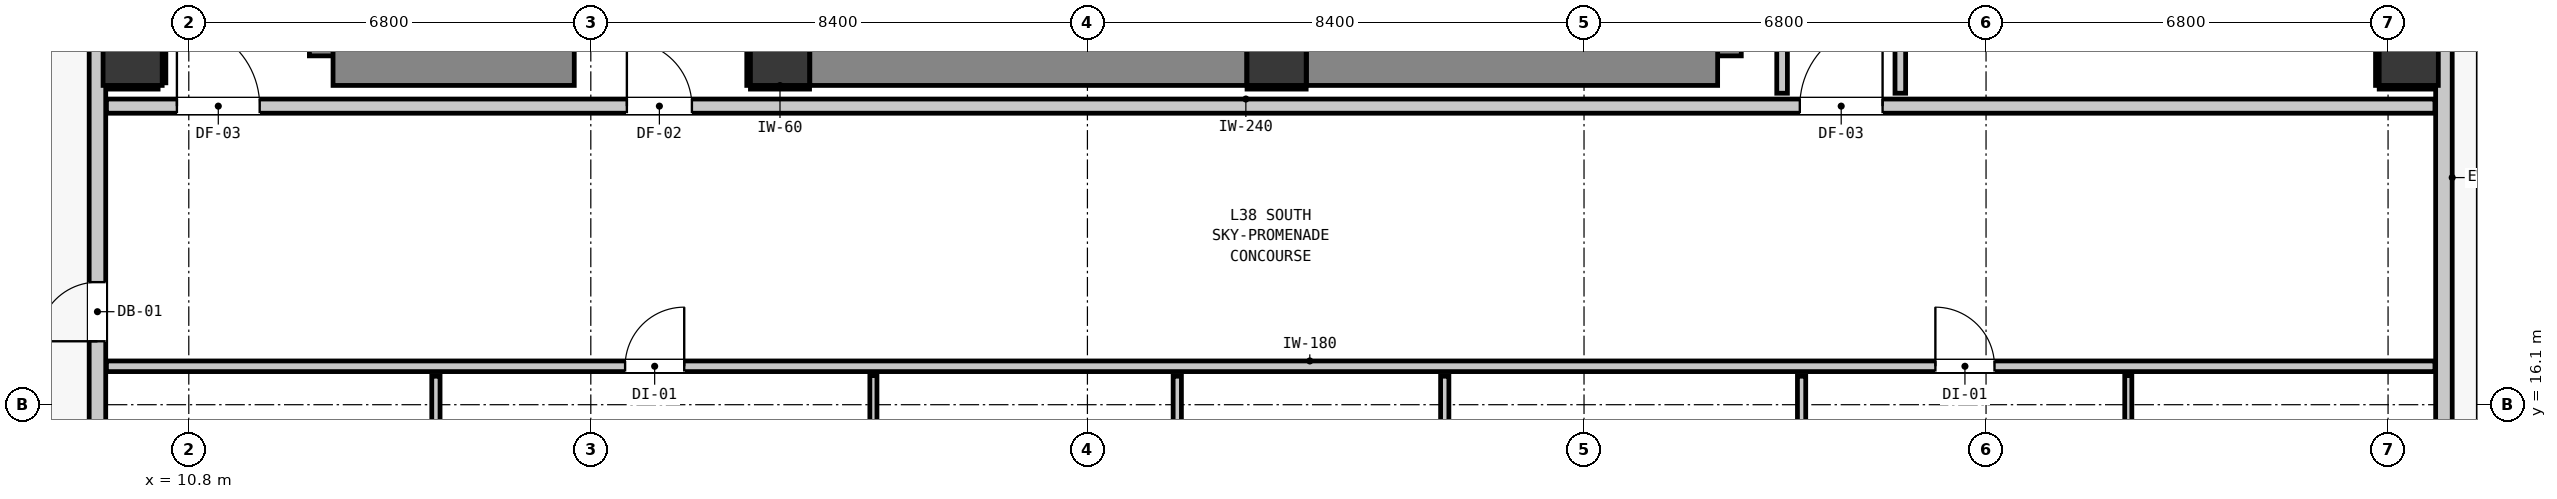
"""IFC4 building model, lengths in metres.
Left out: names, types, materials, properties, quantities, classifications, styles, units other than length and angle.
Written with IfcOpenShell. Run it as: python <this file> out.ifc"""

import sys

from ifc_helpers import new_model, si_unit, direction, frame, frame_2d, origin, origin_2d, place, context, subcontext, project, spatial, rectangle, extrude, element, fill, save


model = new_model("IFC4")
c1 = context("Model", 3, precision=1e-05, world=origin(), true_north=direction((0.0, 1.0)))
c2 = subcontext(c1, "Body", "Model", "MODEL_VIEW")
j1 = project(units=[si_unit("LENGTHUNIT", "METRE"), si_unit("PLANEANGLEUNIT", "RADIAN")], contexts=[c1])
p1 = place(None, origin())
s1 = spatial("IfcSite", under=j1, at=p1, CompositionType="ELEMENT")
p2 = place(p1, origin())
s2 = spatial("IfcBuilding", under=s1, at=p2, CompositionType="ELEMENT")
p3 = place(p2, frame((0.0, 0.0, 132.64)))
s3 = spatial("IfcBuildingStorey", under=s2, at=p3, CompositionType="ELEMENT", Elevation=132.64)
for number, where, z_axis, x_axis in (
    (1, (20.8, 22.0, 0.0), (0.0, 0.0, 1.0), (1.0, 0.0, 0.0)),
    (2, (29.2, 22.0, 0.0), (0.0, 0.0, 1.0), (1.0, 0.0, 0.0)),
):
    element("IfcColumn", number, at=place(p3, frame(where, z_axis=z_axis, x_axis=x_axis)), inside=s3, PredefinedType="COLUMN", context=c2, shape_type="SweptSolid", body=[
        extrude(rectangle(XDim=1.0, YDim=1.0, at=origin_2d()), origin(), (0.0, 0.0, 1.0), 3.32),
    ])
p4 = place(p3, frame((13.34, 22.0, 0.0), z_axis=(0.0, 0.0, 1.0), x_axis=(0.0, 1.0, 0.0)))
e3 = element("IfcWall", 3, at=p4, inside=s3, PredefinedType="SHEAR", context=c2, shape_type="SweptSolid", body=[
    extrude(rectangle(XDim=8.195, YDim=1.0, at=frame_2d((4.098, 0.0))), origin(), (0.0, 0.0, 1.0), 3.32),
])
p5 = place(p3, frame((13.24, 22.0, 0.0), z_axis=(0.0, 0.0, 1.0), x_axis=(1.0, 0.0, 0.0)))
e4 = element("IfcWall", 4, at=p5, inside=s3, PredefinedType="SHEAR", context=c2, shape_type="SweptSolid", body=[
    extrude(rectangle(XDim=4.08, YDim=1.0, at=frame_2d((2.04, 0.0))), origin(), (0.0, 0.0, 1.0), 3.32),
])
p6 = place(p3, frame((36.56, 22.0, 0.0), z_axis=(0.0, 0.0, 1.0), x_axis=(0.0, 1.0, 0.0)))
e5 = element("IfcWall", 5, at=p6, inside=s3, PredefinedType="SHEAR", context=c2, shape_type="SweptSolid", body=[
    extrude(rectangle(XDim=8.195, YDim=1.0, at=frame_2d((4.098, 0.0))), origin(), (0.0, 0.0, 1.0), 3.32),
])
p7 = place(p3, frame((29.705, 22.0, 0.0), z_axis=(0.0, 0.0, 1.0), x_axis=(1.0, 0.0, 0.0)))
e6 = element("IfcWall", 6, at=p7, inside=s3, PredefinedType="SHEAR", context=c2, shape_type="SweptSolid", body=[
    extrude(rectangle(XDim=6.955, YDim=1.0, at=frame_2d((3.478, 0.0))), origin(), (0.0, 0.0, 1.0), 3.32),
])
p8 = place(p3, frame((21.305, 22.0, 0.0), z_axis=(0.0, 0.0, 1.0), x_axis=(1.0, 0.0, 0.0)))
e7 = element("IfcWall", 7, at=p8, inside=s3, PredefinedType="SHEAR", context=c2, shape_type="SweptSolid", body=[
    extrude(rectangle(XDim=7.39, YDim=1.0, at=frame_2d((3.695, 0.0))), origin(), (0.0, 0.0, 1.0), 3.32),
])
for number, where, z_axis, x_axis in (
    (8, (9.85, 22.0, 0.0), (0.0, 0.0, 1.0), (1.0, 0.0, 0.0)),
    (9, (48.35, 22.0, 0.0), (0.0, 0.0, 1.0), (1.0, 0.0, 0.0)),
):
    element("IfcColumn", number, at=place(p3, frame(where, z_axis=z_axis, x_axis=x_axis)), inside=s3, PredefinedType="COLUMN", context=c2, shape_type="SweptSolid", body=[
        extrude(rectangle(XDim=1.0, YDim=1.0, at=origin_2d()), origin(), (0.0, 0.0, 1.0), 3.32),
    ])
p9 = place(p3, frame((9.255, 11.355, 0.0), z_axis=(0.0, 0.0, 1.0), x_axis=(0.0, 1.0, 0.0)))
e10 = element("IfcWall", 10, at=p9, inside=s3, PredefinedType="STANDARD", context=c2, shape_type="SweptSolid", body=[
    extrude(rectangle(XDim=32.29, YDim=0.28, at=frame_2d((16.145, 0.0))), origin(), (0.0, 0.0, 1.0), 3.08),
])
p10 = place(p9, frame((5.818, 0.0, 0.0)))
e11 = element("IfcOpeningElement", 11, at=p10, cuts=e10, PredefinedType="OPENING", context=c2, shape_type="SweptSolid", body=[
    extrude(rectangle(XDim=1.0, YDim=2.15, at=frame_2d((0.5, 1.075))), frame((0.0, 0.15, 0.0), z_axis=(0.0, -1.0, 0.0), x_axis=(1.0, 0.0, 0.0)), (0.0, 0.0, 1.0), 0.3),
])
p11 = place(p9, frame((0.544, 0.0, 0.85)))
e12 = element("IfcOpeningElement", 12, at=p11, cuts=e10, PredefinedType="OPENING", context=c2, shape_type="SweptSolid", body=[
    extrude(rectangle(XDim=1.05, YDim=1.65, at=frame_2d((0.525, 0.825))), frame((0.0, 0.15, 0.0), z_axis=(0.0, -1.0, 0.0), x_axis=(1.0, 0.0, 0.0)), (0.0, 0.0, 1.0), 0.3),
])
p12 = place(p3, frame((48.945, 43.645, 0.0), z_axis=(0.0, 0.0, 1.0), x_axis=(0.0, -1.0, 0.0)))
e13 = element("IfcWall", 13, at=p12, inside=s3, PredefinedType="STANDARD", context=c2, shape_type="SweptSolid", body=[
    extrude(rectangle(XDim=32.29, YDim=0.28, at=frame_2d((16.145, 0.0))), origin(), (0.0, 0.0, 1.0), 3.08),
])
p13 = place(p12, frame((5.467, 0.0, 0.0)))
e14 = element("IfcOpeningElement", 14, at=p13, cuts=e13, PredefinedType="OPENING", context=c2, shape_type="SweptSolid", body=[
    extrude(rectangle(XDim=1.0, YDim=2.15, at=frame_2d((0.5, 1.075))), frame((0.0, 0.15, 0.0), z_axis=(0.0, -1.0, 0.0), x_axis=(1.0, 0.0, 0.0)), (0.0, 0.0, 1.0), 0.3),
])
p14 = place(p12, frame((30.696, 0.0, 0.85)))
e15 = element("IfcOpeningElement", 15, at=p14, cuts=e13, PredefinedType="OPENING", context=c2, shape_type="SweptSolid", body=[
    extrude(rectangle(XDim=1.05, YDim=1.65, at=frame_2d((0.525, 0.825))), frame((0.0, 0.15, 0.0), z_axis=(0.0, -1.0, 0.0), x_axis=(1.0, 0.0, 0.0)), (0.0, 0.0, 1.0), 0.3),
])
p15 = place(p12, frame((14.611, 0.0, 0.85)))
e16 = element("IfcOpeningElement", 16, at=p15, cuts=e13, PredefinedType="OPENING", context=c2, shape_type="SweptSolid", body=[
    extrude(rectangle(XDim=2.1, YDim=1.9, at=frame_2d((1.05, 0.95))), frame((0.0, 0.15, 0.0), z_axis=(0.0, -1.0, 0.0), x_axis=(1.0, 0.0, 0.0)), (0.0, 0.0, 1.0), 0.3),
])
p16 = place(p12, frame((7.106, 0.0, 0.85)))
e17 = element("IfcOpeningElement", 17, at=p16, cuts=e13, PredefinedType="OPENING", context=c2, shape_type="SweptSolid", body=[
    extrude(rectangle(XDim=1.05, YDim=1.65, at=frame_2d((0.525, 0.825))), frame((0.0, 0.15, 0.0), z_axis=(0.0, -1.0, 0.0), x_axis=(1.0, 0.0, 0.0)), (0.0, 0.0, 1.0), 0.3),
])
p17 = place(p3, frame((9.407, 21.15, 0.0), z_axis=(0.0, 0.0, 1.0), x_axis=(1.0, 0.0, 0.0)))
e18 = element("IfcWall", 18, at=p17, inside=s3, PredefinedType="PARTITIONING", context=c2, shape_type="SweptSolid", body=[
    extrude(rectangle(XDim=39.386, YDim=0.24, at=frame_2d((19.693, 0.0))), origin(), (0.0, 0.0, 1.0), 3.08),
])
p18 = place(p17, frame((8.803, 0.0, 0.0)))
e19 = element("IfcOpeningElement", 19, at=p18, cuts=e18, PredefinedType="OPENING", context=c2, shape_type="SweptSolid", body=[
    extrude(rectangle(XDim=1.1, YDim=2.15, at=frame_2d((0.55, 1.075))), frame((0.0, 0.13, 0.0), z_axis=(0.0, -1.0, 0.0), x_axis=(1.0, 0.0, 0.0)), (0.0, 0.0, 1.0), 0.26),
])
p19 = place(p17, frame((1.192, 0.0, 0.0)))
e20 = element("IfcOpeningElement", 20, at=p19, cuts=e18, PredefinedType="OPENING", context=c2, shape_type="SweptSolid", body=[
    extrude(rectangle(XDim=1.4, YDim=2.15, at=frame_2d((0.7, 1.075))), frame((0.0, 0.13, 0.0), z_axis=(0.0, -1.0, 0.0), x_axis=(1.0, 0.0, 0.0)), (0.0, 0.0, 1.0), 0.26),
])
p20 = place(p17, frame((28.643, 0.0, 0.0)))
e21 = element("IfcOpeningElement", 21, at=p20, cuts=e18, PredefinedType="OPENING", context=c2, shape_type="SweptSolid", body=[
    extrude(rectangle(XDim=1.4, YDim=2.15, at=frame_2d((0.7, 1.075))), frame((0.0, 0.13, 0.0), z_axis=(0.0, -1.0, 0.0), x_axis=(1.0, 0.0, 0.0)), (0.0, 0.0, 1.0), 0.26),
])
p21 = place(p3, frame((9.407, 16.75, 0.0), z_axis=(0.0, 0.0, 1.0), x_axis=(1.0, 0.0, 0.0)))
e22 = element("IfcWall", 22, at=p21, inside=s3, PredefinedType="PARTITIONING", context=c2, shape_type="SweptSolid", body=[
    extrude(rectangle(XDim=39.386, YDim=0.18, at=frame_2d((19.693, 0.0))), origin(), (0.0, 0.0, 1.0), 3.08),
])
p22 = place(p21, frame((8.773, 0.0, 0.0)))
e23 = element("IfcOpeningElement", 23, at=p22, cuts=e22, PredefinedType="OPENING", context=c2, shape_type="SweptSolid", body=[
    extrude(rectangle(XDim=1.0, YDim=2.15, at=frame_2d((0.5, 1.075))), frame((0.0, 0.1, 0.0), z_axis=(0.0, -1.0, 0.0), x_axis=(1.0, 0.0, 0.0)), (0.0, 0.0, 1.0), 0.2),
])
p23 = place(p21, frame((30.936, 0.0, 0.0)))
e24 = element("IfcOpeningElement", 24, at=p23, cuts=e22, PredefinedType="OPENING", context=c2, shape_type="SweptSolid", body=[
    extrude(rectangle(XDim=1.0, YDim=2.15, at=frame_2d((0.5, 1.075))), frame((0.0, 0.1, 0.0), z_axis=(0.0, -1.0, 0.0), x_axis=(1.0, 0.0, 0.0)), (0.0, 0.0, 1.0), 0.2),
])
p24 = place(p3, frame((37.75, 21.368, 0.0), z_axis=(0.0, 0.0, 1.0), x_axis=(0.0, 1.0, 0.0)))
e25 = element("IfcWall", 25, at=p24, inside=s3, PredefinedType="PARTITIONING", context=c2, shape_type="SweptSolid", body=[
    extrude(rectangle(XDim=18.694, YDim=0.18, at=frame_2d((9.347, 0.0))), origin(), (0.0, 0.0, 1.0), 3.08),
])
p25 = place(p3, frame((39.75, 21.368, 0.0), z_axis=(0.0, 0.0, 1.0), x_axis=(0.0, 1.0, 0.0)))
e26 = element("IfcWall", 26, at=p25, inside=s3, PredefinedType="PARTITIONING", context=c2, shape_type="SweptSolid", body=[
    extrude(rectangle(XDim=3.964, YDim=0.18, at=frame_2d((1.982, 0.0))), origin(), (0.0, 0.0, 1.0), 3.08),
])
p26 = place(p3, frame((14.98, 13.652, 0.0), z_axis=(0.0, 0.0, 1.0), x_axis=(0.0, 1.0, 0.0)))
e27 = element("IfcWall", 27, at=p26, inside=s3, PredefinedType="PARTITIONING", context=c2, shape_type="SweptSolid", body=[
    extrude(rectangle(XDim=2.93, YDim=0.14, at=frame_2d((1.465, 0.0))), origin(), (0.0, 0.0, 1.0), 3.08),
])
p27 = place(p26, frame((1.032, 0.0, 0.0)))
e28 = element("IfcOpeningElement", 28, at=p27, cuts=e27, PredefinedType="OPENING", context=c2, shape_type="SweptSolid", body=[
    extrude(rectangle(XDim=0.86, YDim=2.02, at=frame_2d((0.43, 1.01))), frame((0.0, 0.08, 0.0), z_axis=(0.0, -1.0, 0.0), x_axis=(1.0, 0.0, 0.0)), (0.0, 0.0, 1.0), 0.16),
])
p28 = place(p3, frame((27.52, 13.652, 0.0), z_axis=(0.0, 0.0, 1.0), x_axis=(0.0, 1.0, 0.0)))
e29 = element("IfcWall", 29, at=p28, inside=s3, PredefinedType="PARTITIONING", context=c2, shape_type="SweptSolid", body=[
    extrude(rectangle(XDim=2.93, YDim=0.14, at=frame_2d((1.465, 0.0))), origin(), (0.0, 0.0, 1.0), 3.08),
])
p29 = place(p28, frame((1.025, 0.0, 0.0)))
e30 = element("IfcOpeningElement", 30, at=p29, cuts=e29, PredefinedType="OPENING", context=c2, shape_type="SweptSolid", body=[
    extrude(rectangle(XDim=0.9, YDim=2.1, at=frame_2d((0.45, 1.05))), frame((0.0, 0.08, 0.0), z_axis=(0.0, -1.0, 0.0), x_axis=(1.0, 0.0, 0.0)), (0.0, 0.0, 1.0), 0.16),
])
p30 = place(p3, frame((32.044, 13.652, 0.0), z_axis=(0.0, 0.0, 1.0), x_axis=(0.0, 1.0, 0.0)))
e31 = element("IfcWall", 31, at=p30, inside=s3, PredefinedType="PARTITIONING", context=c2, shape_type="SweptSolid", body=[
    extrude(rectangle(XDim=2.93, YDim=0.14, at=frame_2d((1.465, 0.0))), origin(), (0.0, 0.0, 1.0), 3.08),
])
p31 = place(p3, frame((38.08, 13.652, 0.0), z_axis=(0.0, 0.0, 1.0), x_axis=(0.0, 1.0, 0.0)))
e32 = element("IfcWall", 32, at=p31, inside=s3, PredefinedType="PARTITIONING", context=c2, shape_type="SweptSolid", body=[
    extrude(rectangle(XDim=2.93, YDim=0.14, at=frame_2d((1.465, 0.0))), origin(), (0.0, 0.0, 1.0), 3.08),
])
p32 = place(p31, frame((1.032, 0.0, 0.0)))
e33 = element("IfcOpeningElement", 33, at=p32, cuts=e32, PredefinedType="OPENING", context=c2, shape_type="SweptSolid", body=[
    extrude(rectangle(XDim=0.86, YDim=2.02, at=frame_2d((0.43, 1.01))), frame((0.0, 0.08, 0.0), z_axis=(0.0, -1.0, 0.0), x_axis=(1.0, 0.0, 0.0)), (0.0, 0.0, 1.0), 0.16),
])
p33 = place(p3, frame((22.38, 13.642, 0.0), z_axis=(0.0, 0.0, 1.0), x_axis=(0.0, 1.0, 0.0)))
e34 = element("IfcWall", 34, at=p33, inside=s3, PredefinedType="PARTITIONING", context=c2, shape_type="SweptSolid", body=[
    extrude(rectangle(XDim=2.95, YDim=0.12, at=frame_2d((1.475, 0.0))), origin(), (0.0, 0.0, 1.0), 3.08),
])
p34 = place(p33, frame((1.022, 0.0, 0.0)))
e35 = element("IfcOpeningElement", 35, at=p34, cuts=e34, PredefinedType="OPENING", context=c2, shape_type="SweptSolid", body=[
    extrude(rectangle(XDim=0.9, YDim=2.1, at=frame_2d((0.45, 1.05))), frame((0.0, 0.07, 0.0), z_axis=(0.0, -1.0, 0.0), x_axis=(1.0, 0.0, 0.0)), (0.0, 0.0, 1.0), 0.14),
])
p35 = place(p3, frame((43.606, 13.642, 0.0), z_axis=(0.0, 0.0, 1.0), x_axis=(0.0, 1.0, 0.0)))
e36 = element("IfcWall", 36, at=p35, inside=s3, PredefinedType="PARTITIONING", context=c2, shape_type="SweptSolid", body=[
    extrude(rectangle(XDim=2.95, YDim=0.12, at=frame_2d((1.475, 0.0))), origin(), (0.0, 0.0, 1.0), 3.08),
])
p36 = place(p35, frame((1.022, 0.0, 0.0)))
e37 = element("IfcOpeningElement", 37, at=p36, cuts=e36, PredefinedType="OPENING", context=c2, shape_type="SweptSolid", body=[
    extrude(rectangle(XDim=0.9, YDim=2.1, at=frame_2d((0.45, 1.05))), frame((0.0, 0.07, 0.0), z_axis=(0.0, -1.0, 0.0), x_axis=(1.0, 0.0, 0.0)), (0.0, 0.0, 1.0), 0.14),
])
for number, where, z_axis, x_axis in (
    (38, (20.3, 21.468, 0.0), (0.0, 0.0, 1.0), (1.0, 0.0, 0.0)),
    (39, (20.268, 21.5, 0.0), (0.0, 0.0, 1.0), (0.0, 1.0, 0.0)),
    (40, (28.7, 21.468, 0.0), (0.0, 0.0, 1.0), (1.0, 0.0, 0.0)),
):
    element("IfcWall", number, at=place(p3, frame(where, z_axis=z_axis, x_axis=x_axis)), inside=s3, PredefinedType="PARTITIONING", context=c2, shape_type="SweptSolid", body=[
        extrude(rectangle(XDim=1.0, YDim=0.06, at=frame_2d((0.5, 0.0))), origin(), (0.0, 0.0, 1.0), 1.45),
    ])
p37 = place(p3, frame((9.41, 21.468, 0.0), z_axis=(0.0, 0.0, 1.0), x_axis=(1.0, 0.0, 0.0)))
e41 = element("IfcWall", 41, at=p37, inside=s3, PredefinedType="PARTITIONING", context=c2, shape_type="SweptSolid", body=[
    extrude(rectangle(XDim=0.871, YDim=0.06, at=frame_2d((0.436, 0.0))), origin(), (0.0, 0.0, 1.0), 1.45),
])
p38 = place(p3, frame((10.382, 21.544, 0.0), z_axis=(0.0, 0.0, 1.0), x_axis=(0.0, 1.0, 0.0)))
e42 = element("IfcWall", 42, at=p38, inside=s3, PredefinedType="PARTITIONING", context=c2, shape_type="SweptSolid", body=[
    extrude(rectangle(XDim=0.956, YDim=0.06, at=frame_2d((0.478, 0.0))), origin(), (0.0, 0.0, 1.0), 1.45),
])
p39 = place(p3, frame((47.85, 21.468, 0.0), z_axis=(0.0, 0.0, 1.0), x_axis=(1.0, 0.0, 0.0)))
e43 = element("IfcWall", 43, at=p39, inside=s3, PredefinedType="PARTITIONING", context=c2, shape_type="SweptSolid", body=[
    extrude(rectangle(XDim=0.94, YDim=0.06, at=frame_2d((0.47, 0.0))), origin(), (0.0, 0.0, 1.0), 1.45),
])
p40 = place(p3, frame((47.818, 21.5, 0.0), z_axis=(0.0, 0.0, 1.0), x_axis=(0.0, 1.0, 0.0)))
e44 = element("IfcWall", 44, at=p40, inside=s3, PredefinedType="PARTITIONING", context=c2, shape_type="SweptSolid", body=[
    extrude(rectangle(XDim=1.0, YDim=0.06, at=frame_2d((0.5, 0.0))), origin(), (0.0, 0.0, 1.0), 1.45),
])
p41 = place(p10, origin())
e45 = element("IfcDoor", 45, at=p41, inside=s3, OperationType="SINGLE_SWING_LEFT", PredefinedType="DOOR", context=c2, shape_type="SweptSolid", body=[
    extrude(rectangle(XDim=1.0, YDim=2.15, at=frame_2d((0.5, 1.075))), frame((0.0, 0.025, 0.0), z_axis=(0.0, -1.0, 0.0), x_axis=(1.0, 0.0, 0.0)), (0.0, 0.0, 1.0), 0.05),
])
fill(e11, e45)
p42 = place(p18, origin())
e46 = element("IfcDoor", 46, at=p42, inside=s3, OperationType="SINGLE_SWING_LEFT", PredefinedType="DOOR", context=c2, shape_type="SweptSolid", body=[
    extrude(rectangle(XDim=1.1, YDim=2.15, at=frame_2d((0.55, 1.075))), frame((0.0, 0.025, 0.0), z_axis=(0.0, -1.0, 0.0), x_axis=(1.0, 0.0, 0.0)), (0.0, 0.0, 1.0), 0.05),
])
fill(e19, e46)
p43 = place(p19, origin())
e47 = element("IfcDoor", 47, at=p43, inside=s3, OperationType="SINGLE_SWING_LEFT", PredefinedType="DOOR", context=c2, shape_type="SweptSolid", body=[
    extrude(rectangle(XDim=1.4, YDim=2.15, at=frame_2d((0.7, 1.075))), frame((0.0, 0.025, 0.0), z_axis=(0.0, -1.0, 0.0), x_axis=(1.0, 0.0, 0.0)), (0.0, 0.0, 1.0), 0.05),
])
fill(e20, e47)
p44 = place(p20, origin())
e48 = element("IfcDoor", 48, at=p44, inside=s3, OperationType="SINGLE_SWING_RIGHT", PredefinedType="DOOR", context=c2, shape_type="SweptSolid", body=[
    extrude(rectangle(XDim=1.4, YDim=2.15, at=frame_2d((0.7, 1.075))), frame((0.0, 0.025, 0.0), z_axis=(0.0, -1.0, 0.0), x_axis=(1.0, 0.0, 0.0)), (0.0, 0.0, 1.0), 0.05),
])
fill(e21, e48)
p45 = place(p22, origin())
e49 = element("IfcDoor", 49, at=p45, inside=s3, OperationType="SINGLE_SWING_RIGHT", PredefinedType="DOOR", context=c2, shape_type="SweptSolid", body=[
    extrude(rectangle(XDim=1.0, YDim=2.15, at=frame_2d((0.5, 1.075))), frame((0.0, 0.025, 0.0), z_axis=(0.0, -1.0, 0.0), x_axis=(1.0, 0.0, 0.0)), (0.0, 0.0, 1.0), 0.05),
])
fill(e23, e49)
p46 = place(p23, origin())
e50 = element("IfcDoor", 50, at=p46, inside=s3, OperationType="SINGLE_SWING_LEFT", PredefinedType="DOOR", context=c2, shape_type="SweptSolid", body=[
    extrude(rectangle(XDim=1.0, YDim=2.15, at=frame_2d((0.5, 1.075))), frame((0.0, 0.025, 0.0), z_axis=(0.0, -1.0, 0.0), x_axis=(1.0, 0.0, 0.0)), (0.0, 0.0, 1.0), 0.05),
])
fill(e24, e50)
save(model, sys.argv[1])
